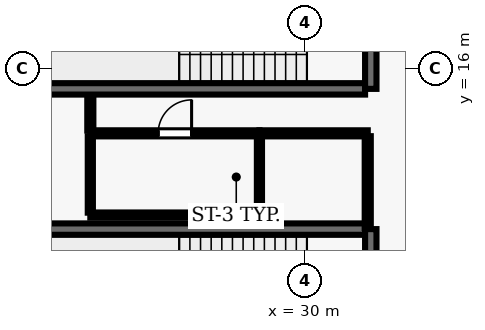
"""IFC4 building model, lengths in metres.
Left out: names, types, materials, properties, quantities, classifications, styles, units other than length and angle.
Written with IfcOpenShell. Run it as: python <this file> out.ifc"""

import sys

from ifc_helpers import new_model, si_unit, direction, frame, frame_2d, origin, place, context, subcontext, project, spatial, rectangle, extrude, element, fill, save


model = new_model("IFC4")
c1 = context("Model", 3, precision=1e-05, world=origin(), true_north=direction((0.0, 1.0)))
c2 = subcontext(c1, "Body", "Model", "MODEL_VIEW")
j1 = project(units=[si_unit("LENGTHUNIT", "METRE"), si_unit("PLANEANGLEUNIT", "RADIAN")], contexts=[c1])
p1 = place(None, origin())
s1 = spatial("IfcSite", under=j1, at=p1, CompositionType="ELEMENT")
p2 = place(p1, origin())
s2 = spatial("IfcBuilding", under=s1, at=p2, CompositionType="ELEMENT")
p3 = place(p2, frame((0.0, 0.0, -4.5)))
s3 = spatial("IfcBuildingStorey", under=s2, at=p3, CompositionType="ELEMENT", Elevation=-4.5)
p4 = place(p3, frame((23.22, 15.47, 0.0), z_axis=(0.0, 0.0, 1.0), x_axis=(1.0, 0.0, 0.0)))
e1 = element("IfcWall", 1, at=p4, inside=s3, PredefinedType="SHEAR", context=c2, shape_type="SweptSolid", body=[
    extrude(rectangle(XDim=8.36, YDim=0.3, at=frame_2d((4.18, 0.0))), origin(), (0.0, 0.0, 1.0), 4.22),
])
p5 = place(p3, frame((31.73, 15.47, 0.0), z_axis=(0.0, 0.0, 1.0), x_axis=(0.0, 1.0, 0.0)))
e2 = element("IfcWall", 2, at=p5, inside=s3, PredefinedType="SHEAR", context=c2, shape_type="SweptSolid", body=[
    extrude(rectangle(XDim=3.51, YDim=0.3, at=frame_2d((1.755, 0.0))), origin(), (0.0, 0.0, 1.0), 4.22),
])
p6 = place(p5, frame((1.18, 0.0, 0.0)))
e3 = element("IfcOpeningElement", 3, at=p6, cuts=e2, PredefinedType="OPENING", context=c2, shape_type="SweptSolid", body=[
    extrude(rectangle(XDim=1.15, YDim=2.15, at=frame_2d((0.575, 1.075))), frame((0.0, 0.16, 0.0), z_axis=(0.0, -1.0, 0.0), x_axis=(1.0, 0.0, 0.0)), (0.0, 0.0, 1.0), 0.32),
])
p7 = place(p3, frame((31.58, 11.78, 0.0), z_axis=(0.0, 0.0, 1.0), x_axis=(-1.0, 0.0, 0.0)))
e4 = element("IfcWall", 4, at=p7, inside=s3, PredefinedType="SHEAR", context=c2, shape_type="SweptSolid", body=[
    extrude(rectangle(XDim=8.36, YDim=0.3, at=frame_2d((4.18, 0.0))), origin(), (0.0, 0.0, 1.0), 4.22),
])
p8 = place(p3, frame((31.73, 8.27, 0.0), z_axis=(0.0, 0.0, 1.0), x_axis=(0.0, 1.0, 0.0)))
e5 = element("IfcWall", 5, at=p8, inside=s3, PredefinedType="SHEAR", context=c2, shape_type="SweptSolid", body=[
    extrude(rectangle(XDim=3.51, YDim=0.3, at=frame_2d((1.755, 0.0))), origin(), (0.0, 0.0, 1.0), 4.22),
])
p9 = place(p8, frame((1.18, 0.0, 0.0)))
e6 = element("IfcOpeningElement", 6, at=p9, cuts=e5, PredefinedType="OPENING", context=c2, shape_type="SweptSolid", body=[
    extrude(rectangle(XDim=1.15, YDim=2.15, at=frame_2d((0.575, 1.075))), frame((0.0, 0.16, 0.0), z_axis=(0.0, -1.0, 0.0), x_axis=(1.0, 0.0, 0.0)), (0.0, 0.0, 1.0), 0.32),
])
p10 = place(p3, frame((24.35, 12.15, 0.0), z_axis=(0.0, 0.0, 1.0), x_axis=(1.0, 0.0, 0.0)))
e7 = element("IfcWall", 7, at=p10, inside=s3, PredefinedType="PARTITIONING", context=c2, shape_type="SweptSolid", body=[
    extrude(rectangle(XDim=4.45, YDim=0.135, at=frame_2d((2.225, 0.0))), origin(), (0.0, 0.0, 1.0), 4.22),
])
p11 = place(p3, frame((24.35, 14.3, 0.0), z_axis=(0.0, 0.0, 1.0), x_axis=(1.0, 0.0, 0.0)))
e8 = element("IfcWall", 8, at=p11, inside=s3, PredefinedType="PARTITIONING", context=c2, shape_type="SweptSolid", body=[
    extrude(rectangle(XDim=4.45, YDim=0.16, at=frame_2d((2.225, 0.0))), origin(), (0.0, 0.0, 1.0), 3.365),
])
p12 = place(p11, frame((1.785, 0.0, 0.0)))
e9 = element("IfcOpeningElement", 9, at=p12, cuts=e8, PredefinedType="OPENING", context=c2, shape_type="SweptSolid", body=[
    extrude(rectangle(XDim=0.88, YDim=2.1, at=frame_2d((0.44, 1.05))), frame((0.0, 0.09, 0.0), z_axis=(0.0, -1.0, 0.0), x_axis=(1.0, 0.0, 0.0)), (0.0, 0.0, 1.0), 0.18),
])
p13 = place(p3, frame((28.8, 14.3, 0.0), z_axis=(0.0, 0.0, 1.0), x_axis=(1.0, 0.0, 0.0)))
e10 = element("IfcWall", 10, at=p13, inside=s3, PredefinedType="PARTITIONING", context=c2, shape_type="SweptSolid", body=[
    extrude(rectangle(XDim=2.85, YDim=0.16, at=frame_2d((1.425, 0.0))), origin(), (0.0, 0.0, 1.0), 3.365),
])
p14 = place(p3, frame((24.35, 14.225, 0.0), z_axis=(0.0, 0.0, 1.0), x_axis=(0.0, -1.0, 0.0)))
e11 = element("IfcWall", 11, at=p14, inside=s3, PredefinedType="PARTITIONING", context=c2, shape_type="SweptSolid", body=[
    extrude(rectangle(XDim=2.012, YDim=0.135, at=frame_2d((1.006, 0.0))), origin(), (0.0, 0.0, 1.0), 4.22),
])
p15 = place(p3, frame((24.35, 15.29, 0.0), z_axis=(0.0, 0.0, 1.0), x_axis=(0.0, -1.0, 0.0)))
e12 = element("IfcWall", 12, at=p15, inside=s3, PredefinedType="PARTITIONING", context=c2, shape_type="SweptSolid", body=[
    extrude(rectangle(XDim=0.915, YDim=0.16, at=frame_2d((0.458, 0.0))), origin(), (0.0, 0.0, 1.0), 4.22),
])
p16 = place(p3, frame((28.8, 12.213, 0.0), z_axis=(0.0, 0.0, 1.0), x_axis=(0.0, 1.0, 0.0)))
e13 = element("IfcWall", 13, at=p16, inside=s3, PredefinedType="PARTITIONING", context=c2, shape_type="SweptSolid", body=[
    extrude(rectangle(XDim=2.012, YDim=0.135, at=frame_2d((1.006, 0.0))), origin(), (0.0, 0.0, 1.0), 4.22),
])
p17 = place(p3, frame((31.65, 14.225, 0.0), z_axis=(0.0, 0.0, 1.0), x_axis=(0.0, -1.0, 0.0)))
e14 = element("IfcWall", 14, at=p17, inside=s3, PredefinedType="PARTITIONING", context=c2, shape_type="SweptSolid", body=[
    extrude(rectangle(XDim=2.415, YDim=0.16, at=frame_2d((1.208, 0.0))), origin(), (0.0, 0.0, 1.0), 4.22),
])
p18 = place(p12, origin())
e15 = element("IfcDoor", 15, at=p18, inside=s3, OperationType="SINGLE_SWING_RIGHT", PredefinedType="DOOR", context=c2, shape_type="SweptSolid", body=[
    extrude(rectangle(XDim=0.88, YDim=2.1, at=frame_2d((0.44, 1.05))), frame((0.0, 0.025, 0.0), z_axis=(0.0, -1.0, 0.0), x_axis=(1.0, 0.0, 0.0)), (0.0, 0.0, 1.0), 0.05),
])
fill(e9, e15)
save(model, sys.argv[1])
